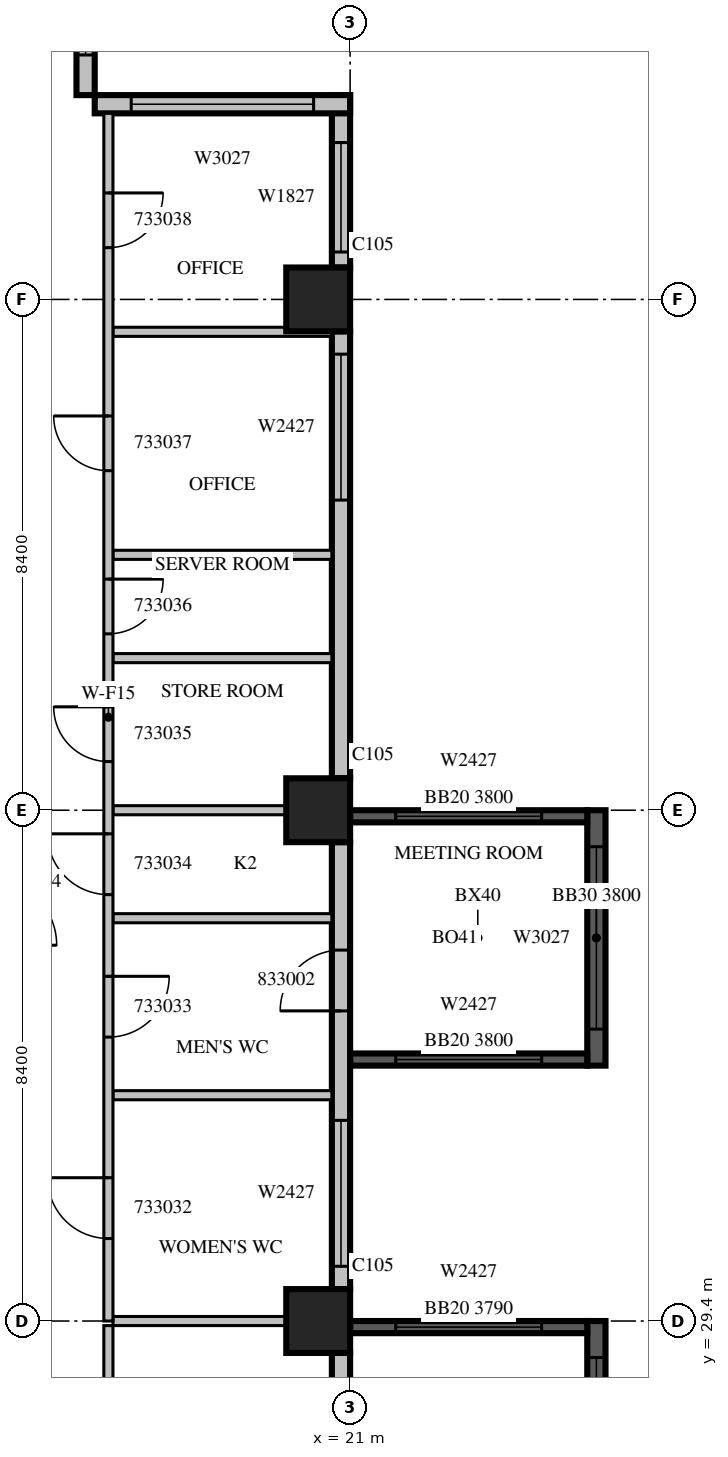
"""IFC4 building model, lengths in metres.
Left out: names, types, materials, properties, quantities, classifications, styles, units other than length and angle.
Written with IfcOpenShell. Run it as: python <this file> out.ifc"""

import sys

from ifc_helpers import new_model, si_unit, direction, frame, frame_2d, origin, origin_2d, place, context, subcontext, project, spatial, rectangle, extrude, source, transform, mapped, element, fill, save


model = new_model("IFC4")
c1 = context("Model", 3, precision=1e-05, world=origin(), true_north=direction((0.0, 1.0)))
c2 = subcontext(c1, "Body", "Model", "MODEL_VIEW")
j1 = project(units=[si_unit("LENGTHUNIT", "METRE"), si_unit("PLANEANGLEUNIT", "RADIAN")], contexts=[c1])
p1 = place(None, origin())
s1 = spatial("IfcSite", under=j1, at=p1, CompositionType="ELEMENT")
p2 = place(p1, origin())
s2 = spatial("IfcBuilding", under=s1, at=p2, CompositionType="ELEMENT")
p3 = place(p2, frame((0.0, 0.0, 149.7)))
s3 = spatial("IfcBuildingStorey", under=s2, at=p3, CompositionType="ELEMENT", Elevation=149.7)
m1 = source(origin(), c2, "Body", "SweptSolid", [
    extrude(rectangle(XDim=1.05, YDim=1.05, at=origin_2d()), origin(), (0.0, 0.0, 1.0), 4.2),
])
for number, where, z_axis, x_axis in (
    (1, (20.475, 29.4, 0.0), (0.0, 0.0, 1.0), (1.0, 0.0, 0.0)),
    (2, (20.475, 37.8, 0.0), (0.0, 0.0, 1.0), (1.0, 0.0, 0.0)),
    (3, (20.475, 46.2, 0.0), (0.0, 0.0, 1.0), (1.0, 0.0, 0.0)),
):
    element("IfcColumn", number, at=place(p3, frame(where, z_axis=z_axis, x_axis=x_axis)), inside=s3, PredefinedType="COLUMN", context=c2, shape_type="MappedRepresentation", body=[
        mapped(m1, transform((0.0, 0.0, 0.0), scale=1.0)),
    ])
m2 = source(origin(), c2, "Body", "SweptSolid", [
    extrude(rectangle(XDim=4.2, YDim=0.3, at=frame_2d((2.1, 0.0))), origin(), (0.0, 0.0, 1.0), 3.8),
])
p4 = place(p3, frame((25.05, 33.6, 0.0), z_axis=(0.0, 0.0, 1.0), x_axis=(0.0, 1.0, 0.0)))
e4 = element("IfcWall", 4, at=p4, inside=s3, PredefinedType="SOLIDWALL", context=c2, shape_type="MappedRepresentation", body=[
    mapped(m2, transform((0.0, 0.0, 0.0), scale=1.0)),
])
m3 = source(origin(), c2, "Body", "SweptSolid", [
    extrude(rectangle(XDim=3.0, YDim=2.7, at=frame_2d((1.5, 1.35))), frame((0.0, 0.16, 0.0), z_axis=(0.0, -1.0, 0.0), x_axis=(1.0, 0.0, 0.0)), (0.0, 0.0, 1.0), 0.32),
])
p5 = place(p4, frame((0.6, 0.0, 0.6)))
e5 = element("IfcOpeningElement", 5, at=p5, cuts=e4, PredefinedType="OPENING", context=c2, shape_type="MappedRepresentation", body=[
    mapped(m3, transform((0.0, 0.0, 0.0), scale=1.0)),
])
m4 = source(origin(), c2, "Body", "SweptSolid", [
    extrude(rectangle(XDim=3.9, YDim=0.2, at=frame_2d((1.95, 0.0))), origin(), (0.0, 0.0, 1.0), 3.8),
])
p6 = place(p3, frame((21.0, 33.7, 0.0), z_axis=(0.0, 0.0, 1.0), x_axis=(1.0, 0.0, 0.0)))
e6 = element("IfcWall", 6, at=p6, inside=s3, PredefinedType="SOLIDWALL", context=c2, shape_type="MappedRepresentation", body=[
    mapped(m4, transform((0.0, 0.0, 0.0), scale=1.0)),
])
m5 = source(origin(), c2, "Body", "SweptSolid", [
    extrude(rectangle(XDim=2.4, YDim=2.7, at=frame_2d((1.2, 1.35))), frame((0.0, 0.11, 0.0), z_axis=(0.0, -1.0, 0.0), x_axis=(1.0, 0.0, 0.0)), (0.0, 0.0, 1.0), 0.22),
])
p7 = place(p6, frame((0.75, 0.0, 0.6)))
e7 = element("IfcOpeningElement", 7, at=p7, cuts=e6, PredefinedType="OPENING", context=c2, shape_type="MappedRepresentation", body=[
    mapped(m5, transform((0.0, 0.0, 0.0), scale=1.0)),
])
p8 = place(p3, frame((21.0, 37.7, 0.0), z_axis=(0.0, 0.0, 1.0), x_axis=(1.0, 0.0, 0.0)))
e8 = element("IfcWall", 8, at=p8, inside=s3, PredefinedType="SOLIDWALL", context=c2, shape_type="MappedRepresentation", body=[
    mapped(m4, transform((0.0, 0.0, 0.0), scale=1.0)),
])
p9 = place(p8, frame((0.75, 0.0, 0.6)))
e9 = element("IfcOpeningElement", 9, at=p9, cuts=e8, PredefinedType="OPENING", context=c2, shape_type="MappedRepresentation", body=[
    mapped(m5, transform((0.0, 0.0, 0.0), scale=1.0)),
])
m6 = source(origin(), c2, "Body", "SweptSolid", [
    extrude(rectangle(XDim=6.875, YDim=0.3, at=frame_2d((3.438, 0.0))), origin(), (0.0, 0.0, 1.0), 3.8),
])
p10 = place(p3, frame((20.85, 22.0, 0.0), z_axis=(0.0, 0.0, 1.0), x_axis=(0.0, 1.0, 0.0)))
e10 = element("IfcWall", 10, at=p10, inside=s3, PredefinedType="STANDARD", context=c2, shape_type="MappedRepresentation", body=[
    mapped(m6, transform((0.0, 0.0, 0.0), scale=1.0)),
])
m7 = source(origin(), c2, "Body", "SweptSolid", [
    extrude(rectangle(XDim=1.2, YDim=2.7, at=frame_2d((0.6, 1.35))), frame((0.0, 0.16, 0.0), z_axis=(0.0, -1.0, 0.0), x_axis=(1.0, 0.0, 0.0)), (0.0, 0.0, 1.0), 0.32),
])
p11 = place(p10, frame((0.362, 0.0, 0.6)))
e11 = element("IfcOpeningElement", 11, at=p11, cuts=e10, PredefinedType="OPENING", context=c2, shape_type="MappedRepresentation", body=[
    mapped(m7, transform((0.0, 0.0, 0.0), scale=1.0)),
])
m8 = source(origin(), c2, "Body", "SweptSolid", [
    extrude(rectangle(XDim=1.0, YDim=2.1, at=frame_2d((0.5, 1.05))), frame((0.0, 0.16, 0.0), z_axis=(0.0, -1.0, 0.0), x_axis=(1.0, 0.0, 0.0)), (0.0, 0.0, 1.0), 0.32),
])
p12 = place(p10, frame((4.8, 0.0, 0.0)))
e12 = element("IfcOpeningElement", 12, at=p12, cuts=e10, PredefinedType="OPENING", context=c2, shape_type="MappedRepresentation", body=[
    mapped(m8, transform((0.0, 0.0, 0.0), scale=1.0)),
])
m9 = source(origin(), c2, "Body", "SweptSolid", [
    extrude(rectangle(XDim=7.35, YDim=0.3, at=frame_2d((3.675, 0.0))), origin(), (0.0, 0.0, 1.0), 3.8),
])
p13 = place(p3, frame((20.85, 29.925, 0.0), z_axis=(0.0, 0.0, 1.0), x_axis=(0.0, 1.0, 0.0)))
e13 = element("IfcWall", 13, at=p13, inside=s3, PredefinedType="STANDARD", context=c2, shape_type="MappedRepresentation", body=[
    mapped(m9, transform((0.0, 0.0, 0.0), scale=1.0)),
])
m10 = source(origin(), c2, "Body", "SweptSolid", [
    extrude(rectangle(XDim=2.4, YDim=2.7, at=frame_2d((1.2, 1.35))), frame((0.0, 0.16, 0.0), z_axis=(0.0, -1.0, 0.0), x_axis=(1.0, 0.0, 0.0)), (0.0, 0.0, 1.0), 0.32),
])
p14 = place(p13, frame((0.375, 0.0, 0.6)))
e14 = element("IfcOpeningElement", 14, at=p14, cuts=e13, PredefinedType="OPENING", context=c2, shape_type="MappedRepresentation", body=[
    mapped(m10, transform((0.0, 0.0, 0.0), scale=1.0)),
])
p15 = place(p13, frame((4.575, 0.0, 0.0)))
e15 = element("IfcOpeningElement", 15, at=p15, cuts=e13, PredefinedType="OPENING", context=c2, shape_type="MappedRepresentation", body=[
    mapped(m8, transform((0.0, 0.0, 0.0), scale=1.0)),
])
p16 = place(p3, frame((20.85, 38.325, 0.0), z_axis=(0.0, 0.0, 1.0), x_axis=(0.0, 1.0, 0.0)))
e16 = element("IfcWall", 16, at=p16, inside=s3, PredefinedType="STANDARD", context=c2, shape_type="MappedRepresentation", body=[
    mapped(m9, transform((0.0, 0.0, 0.0), scale=1.0)),
])
p17 = place(p16, frame((4.575, 0.0, 0.6)))
e17 = element("IfcOpeningElement", 17, at=p17, cuts=e16, PredefinedType="OPENING", context=c2, shape_type="MappedRepresentation", body=[
    mapped(m10, transform((0.0, 0.0, 0.0), scale=1.0)),
])
m11 = source(origin(), c2, "Body", "SweptSolid", [
    extrude(rectangle(XDim=2.835, YDim=0.3, at=frame_2d((1.417, 0.0))), origin(), (0.0, 0.0, 1.0), 3.8),
])
p18 = place(p3, frame((20.85, 46.725, 0.0), z_axis=(0.0, 0.0, 1.0), x_axis=(0.0, 1.0, 0.0)))
e18 = element("IfcWall", 18, at=p18, inside=s3, PredefinedType="STANDARD", context=c2, shape_type="MappedRepresentation", body=[
    mapped(m11, transform((0.0, 0.0, 0.0), scale=1.0)),
])
m12 = source(origin(), c2, "Body", "SweptSolid", [
    extrude(rectangle(XDim=1.8, YDim=2.7, at=frame_2d((0.9, 1.35))), frame((0.0, 0.16, 0.0), z_axis=(0.0, -1.0, 0.0), x_axis=(1.0, 0.0, 0.0)), (0.0, 0.0, 1.0), 0.32),
])
p19 = place(p18, frame((0.255, 0.0, 0.6)))
e19 = element("IfcOpeningElement", 19, at=p19, cuts=e18, PredefinedType="OPENING", context=c2, shape_type="MappedRepresentation", body=[
    mapped(m12, transform((0.0, 0.0, 0.0), scale=1.0)),
])
m13 = source(origin(), c2, "Body", "SweptSolid", [
    extrude(rectangle(XDim=4.2, YDim=0.3, at=frame_2d((2.1, 0.0))), origin(), (0.0, 0.0, 1.0), 3.8),
])
p20 = place(p3, frame((21.0, 49.41, 0.0), z_axis=(0.0, 0.0, 1.0), x_axis=(-1.0, 0.0, 0.0)))
e20 = element("IfcWall", 20, at=p20, inside=s3, PredefinedType="STANDARD", context=c2, shape_type="MappedRepresentation", body=[
    mapped(m13, transform((0.0, 0.0, 0.0), scale=1.0)),
])
p21 = place(p20, frame((0.6, 0.0, 0.6)))
e21 = element("IfcOpeningElement", 21, at=p21, cuts=e20, PredefinedType="OPENING", context=c2, shape_type="MappedRepresentation", body=[
    mapped(m3, transform((0.0, 0.0, 0.0), scale=1.0)),
])
m14 = source(origin(), c2, "Body", "SweptSolid", [
    extrude(rectangle(XDim=2.52, YDim=0.3, at=frame_2d((1.26, 0.0))), origin(), (0.0, 0.0, 1.0), 3.8),
])
p22 = place(p3, frame((16.65, 49.56, 0.0), z_axis=(0.0, 0.0, 1.0), x_axis=(0.0, 1.0, 0.0)))
e22 = element("IfcWall", 22, at=p22, inside=s3, PredefinedType="STANDARD", context=c2, shape_type="MappedRepresentation", body=[
    mapped(m14, transform((0.0, 0.0, 0.0), scale=1.0)),
])
p23 = place(p22, frame((0.66, 0.0, 0.6)))
e23 = element("IfcOpeningElement", 23, at=p23, cuts=e22, PredefinedType="OPENING", context=c2, shape_type="MappedRepresentation", body=[
    mapped(m7, transform((0.0, 0.0, 0.0), scale=1.0)),
])
m15 = source(origin(), c2, "Body", "SweptSolid", [
    extrude(rectangle(XDim=4.2, YDim=0.3, at=frame_2d((2.1, 0.0))), origin(), (0.0, 0.0, 1.0), 3.79),
])
p24 = place(p3, frame((25.05, 25.2, 0.0), z_axis=(0.0, 0.0, 1.0), x_axis=(0.0, 1.0, 0.0)))
e24 = element("IfcWall", 24, at=p24, inside=s3, PredefinedType="SOLIDWALL", context=c2, shape_type="MappedRepresentation", body=[
    mapped(m15, transform((0.0, 0.0, 0.0), scale=1.0)),
])
p25 = place(p24, frame((0.6, 0.0, 0.6)))
e25 = element("IfcOpeningElement", 25, at=p25, cuts=e24, PredefinedType="OPENING", context=c2, shape_type="MappedRepresentation", body=[
    mapped(m3, transform((0.0, 0.0, 0.0), scale=1.0)),
])
m16 = source(origin(), c2, "Body", "SweptSolid", [
    extrude(rectangle(XDim=3.9, YDim=0.2, at=frame_2d((1.95, 0.0))), origin(), (0.0, 0.0, 1.0), 3.79),
])
p26 = place(p3, frame((21.0, 29.3, 0.0), z_axis=(0.0, 0.0, 1.0), x_axis=(1.0, 0.0, 0.0)))
e26 = element("IfcWall", 26, at=p26, inside=s3, PredefinedType="SOLIDWALL", context=c2, shape_type="MappedRepresentation", body=[
    mapped(m16, transform((0.0, 0.0, 0.0), scale=1.0)),
])
p27 = place(p26, frame((0.75, 0.0, 0.6)))
e27 = element("IfcOpeningElement", 27, at=p27, cuts=e26, PredefinedType="OPENING", context=c2, shape_type="MappedRepresentation", body=[
    mapped(m5, transform((0.0, 0.0, 0.0), scale=1.0)),
])
m17 = source(origin(), c2, "Body", "SweptSolid", [
    extrude(rectangle(XDim=5.35, YDim=0.15, at=frame_2d((2.675, 0.0))), origin(), (0.0, 0.0, 1.0), 3.8),
])
p28 = place(p3, frame((17.025, 29.325, 0.0), z_axis=(0.0, 0.0, 1.0), x_axis=(0.0, -1.0, 0.0)))
e28 = element("IfcWall", 28, at=p28, inside=s3, PredefinedType="PARTITIONING", context=c2, shape_type="MappedRepresentation", body=[
    mapped(m17, transform((0.0, 0.0, 0.0), scale=1.0)),
])
m18 = source(origin(), c2, "Body", "SweptSolid", [
    extrude(rectangle(XDim=2.851, YDim=0.15, at=frame_2d((1.425, 0.0))), origin(), (0.0, 0.0, 1.0), 3.8),
])
p29 = place(p3, frame((19.951, 29.4, 0.0), z_axis=(0.0, 0.0, 1.0), x_axis=(-1.0, 0.0, 0.0)))
e29 = element("IfcWall", 29, at=p29, inside=s3, PredefinedType="PARTITIONING", context=c2, shape_type="MappedRepresentation", body=[
    mapped(m18, transform((0.0, 0.0, 0.0), scale=1.0)),
])
m19 = source(origin(), c2, "Body", "SweptSolid", [
    extrude(rectangle(XDim=3.6, YDim=0.15, at=frame_2d((1.8, 0.0))), origin(), (0.0, 0.0, 1.0), 3.8),
])
for number, where, z_axis, x_axis in (
    (30, (17.1, 33.113, 0.0), (0.0, 0.0, 1.0), (1.0, 0.0, 0.0)),
    (31, (17.1, 36.024, 0.0), (0.0, 0.0, 1.0), (1.0, 0.0, 0.0)),
    (32, (17.1, 40.301, 0.0), (0.0, 0.0, 1.0), (1.0, 0.0, 0.0)),
    (33, (17.1, 45.667, 0.0), (0.0, 0.0, 1.0), (1.0, 0.0, 0.0)),
):
    element("IfcWall", number, at=place(p3, frame(where, z_axis=z_axis, x_axis=x_axis)), inside=s3, PredefinedType="PARTITIONING", context=c2, shape_type="MappedRepresentation", body=[
        mapped(m19, transform((0.0, 0.0, 0.0), scale=1.0)),
    ])
p30 = place(p3, frame((19.951, 37.8, 0.0), z_axis=(0.0, 0.0, 1.0), x_axis=(-1.0, 0.0, 0.0)))
e34 = element("IfcWall", 34, at=p30, inside=s3, PredefinedType="PARTITIONING", context=c2, shape_type="MappedRepresentation", body=[
    mapped(m18, transform((0.0, 0.0, 0.0), scale=1.0)),
])
p31 = place(p3, frame((20.7, 42.0, 0.0), z_axis=(0.0, 0.0, 1.0), x_axis=(-1.0, 0.0, 0.0)))
e35 = element("IfcWall", 35, at=p31, inside=s3, PredefinedType="PARTITIONING", context=c2, shape_type="MappedRepresentation", body=[
    mapped(m19, transform((0.0, 0.0, 0.0), scale=1.0)),
])
m20 = source(origin(), c2, "Body", "SweptSolid", [
    extrude(rectangle(XDim=19.86, YDim=0.15, at=frame_2d((9.93, 0.0))), origin(), (0.0, 0.0, 1.0), 3.8),
])
p32 = place(p3, frame((17.025, 49.26, 0.0), z_axis=(0.0, 0.0, 1.0), x_axis=(0.0, -1.0, 0.0)))
e36 = element("IfcWall", 36, at=p32, inside=s3, PredefinedType="PARTITIONING", context=c2, shape_type="MappedRepresentation", body=[
    mapped(m20, transform((0.0, 0.0, 0.0), scale=1.0)),
])
m21 = source(origin(), c2, "Body", "SweptSolid", [
    extrude(rectangle(XDim=1.0, YDim=2.1, at=frame_2d((0.5, 1.05))), frame((0.0, 0.085, 0.0), z_axis=(0.0, -1.0, 0.0), x_axis=(1.0, 0.0, 0.0)), (0.0, 0.0, 1.0), 0.17),
])
p33 = place(p32, frame((17.503, 0.0, 0.0)))
e37 = element("IfcOpeningElement", 37, at=p33, cuts=e36, PredefinedType="OPENING", context=c2, shape_type="MappedRepresentation", body=[
    mapped(m21, transform((0.0, 0.0, 0.0), scale=1.0)),
])
p34 = place(p32, frame((14.191, 0.0, 0.0)))
e38 = element("IfcOpeningElement", 38, at=p34, cuts=e36, PredefinedType="OPENING", context=c2, shape_type="MappedRepresentation", body=[
    mapped(m21, transform((0.0, 0.0, 0.0), scale=1.0)),
])
p35 = place(p32, frame((11.848, 0.0, 0.0)))
e39 = element("IfcOpeningElement", 39, at=p35, cuts=e36, PredefinedType="OPENING", context=c2, shape_type="MappedRepresentation", body=[
    mapped(m21, transform((0.0, 0.0, 0.0), scale=1.0)),
])
m22 = source(origin(), c2, "Body", "SweptSolid", [
    extrude(rectangle(XDim=0.9, YDim=2.1, at=frame_2d((0.45, 1.05))), frame((0.0, 0.085, 0.0), z_axis=(0.0, -1.0, 0.0), x_axis=(1.0, 0.0, 0.0)), (0.0, 0.0, 1.0), 0.17),
])
p36 = place(p32, frame((9.759, 0.0, 0.0)))
e40 = element("IfcOpeningElement", 40, at=p36, cuts=e36, PredefinedType="OPENING", context=c2, shape_type="MappedRepresentation", body=[
    mapped(m22, transform((0.0, 0.0, 0.0), scale=1.0)),
])
p37 = place(p32, frame((7.659, 0.0, 0.0)))
e41 = element("IfcOpeningElement", 41, at=p37, cuts=e36, PredefinedType="OPENING", context=c2, shape_type="MappedRepresentation", body=[
    mapped(m22, transform((0.0, 0.0, 0.0), scale=1.0)),
])
p38 = place(p32, frame((4.976, 0.0, 0.0)))
e42 = element("IfcOpeningElement", 42, at=p38, cuts=e36, PredefinedType="OPENING", context=c2, shape_type="MappedRepresentation", body=[
    mapped(m22, transform((0.0, 0.0, 0.0), scale=1.0)),
])
p39 = place(p32, frame((1.309, 0.0, 0.0)))
e43 = element("IfcOpeningElement", 43, at=p39, cuts=e36, PredefinedType="OPENING", context=c2, shape_type="MappedRepresentation", body=[
    mapped(m22, transform((0.0, 0.0, 0.0), scale=1.0)),
])
m23 = source(origin(), c2, "Body", "SweptSolid", [
    extrude(rectangle(XDim=3.0, YDim=2.7, at=frame_2d((1.5, 1.35))), frame((0.0, 0.03, 0.0), z_axis=(0.0, -1.0, 0.0), x_axis=(1.0, 0.0, 0.0)), (0.0, 0.0, 1.0), 0.06),
])
p40 = place(p5, origin())
e44 = element("IfcWindow", 44, at=p40, inside=s3, PartitioningType="SINGLE_PANEL", PredefinedType="WINDOW", context=c2, shape_type="MappedRepresentation", body=[
    mapped(m23, transform((0.0, 0.0, 0.0), scale=1.0)),
])
fill(e5, e44)
m24 = source(origin(), c2, "Body", "SweptSolid", [
    extrude(rectangle(XDim=2.4, YDim=2.7, at=frame_2d((1.2, 1.35))), frame((0.0, 0.03, 0.0), z_axis=(0.0, -1.0, 0.0), x_axis=(1.0, 0.0, 0.0)), (0.0, 0.0, 1.0), 0.06),
])
p41 = place(p7, origin())
e45 = element("IfcWindow", 45, at=p41, inside=s3, PartitioningType="SINGLE_PANEL", PredefinedType="WINDOW", context=c2, shape_type="MappedRepresentation", body=[
    mapped(m24, transform((0.0, 0.0, 0.0), scale=1.0)),
])
fill(e7, e45)
p42 = place(p9, origin())
e46 = element("IfcWindow", 46, at=p42, inside=s3, PartitioningType="SINGLE_PANEL", PredefinedType="WINDOW", context=c2, shape_type="MappedRepresentation", body=[
    mapped(m24, transform((0.0, 0.0, 0.0), scale=1.0)),
])
fill(e9, e46)
p43 = place(p14, origin())
e47 = element("IfcWindow", 47, at=p43, inside=s3, PartitioningType="SINGLE_PANEL", PredefinedType="WINDOW", context=c2, shape_type="MappedRepresentation", body=[
    mapped(m24, transform((0.0, 0.0, 0.0), scale=1.0)),
])
fill(e14, e47)
p44 = place(p17, origin())
e48 = element("IfcWindow", 48, at=p44, inside=s3, PartitioningType="SINGLE_PANEL", PredefinedType="WINDOW", context=c2, shape_type="MappedRepresentation", body=[
    mapped(m24, transform((0.0, 0.0, 0.0), scale=1.0)),
])
fill(e17, e48)
m25 = source(origin(), c2, "Body", "SweptSolid", [
    extrude(rectangle(XDim=1.8, YDim=2.7, at=frame_2d((0.9, 1.35))), frame((0.0, 0.03, 0.0), z_axis=(0.0, -1.0, 0.0), x_axis=(1.0, 0.0, 0.0)), (0.0, 0.0, 1.0), 0.06),
])
p45 = place(p19, origin())
e49 = element("IfcWindow", 49, at=p45, inside=s3, PartitioningType="SINGLE_PANEL", PredefinedType="WINDOW", context=c2, shape_type="MappedRepresentation", body=[
    mapped(m25, transform((0.0, 0.0, 0.0), scale=1.0)),
])
fill(e19, e49)
p46 = place(p21, origin())
e50 = element("IfcWindow", 50, at=p46, inside=s3, PartitioningType="SINGLE_PANEL", PredefinedType="WINDOW", context=c2, shape_type="MappedRepresentation", body=[
    mapped(m23, transform((0.0, 0.0, 0.0), scale=1.0)),
])
fill(e21, e50)
m26 = source(origin(), c2, "Body", "SweptSolid", [
    extrude(rectangle(XDim=1.2, YDim=2.7, at=frame_2d((0.6, 1.35))), frame((0.0, 0.03, 0.0), z_axis=(0.0, -1.0, 0.0), x_axis=(1.0, 0.0, 0.0)), (0.0, 0.0, 1.0), 0.06),
])
p47 = place(p23, origin())
e51 = element("IfcWindow", 51, at=p47, inside=s3, PartitioningType="SINGLE_PANEL", PredefinedType="WINDOW", context=c2, shape_type="MappedRepresentation", body=[
    mapped(m26, transform((0.0, 0.0, 0.0), scale=1.0)),
])
fill(e23, e51)
p48 = place(p25, origin())
e52 = element("IfcWindow", 52, at=p48, inside=s3, PartitioningType="SINGLE_PANEL", PredefinedType="WINDOW", context=c2, shape_type="MappedRepresentation", body=[
    mapped(m23, transform((0.0, 0.0, 0.0), scale=1.0)),
])
fill(e25, e52)
p49 = place(p27, origin())
e53 = element("IfcWindow", 53, at=p49, inside=s3, PartitioningType="SINGLE_PANEL", PredefinedType="WINDOW", context=c2, shape_type="MappedRepresentation", body=[
    mapped(m24, transform((0.0, 0.0, 0.0), scale=1.0)),
])
fill(e27, e53)
m27 = source(origin(), c2, "Body", "SweptSolid", [
    extrude(rectangle(XDim=1.0, YDim=2.1, at=frame_2d((0.5, 1.05))), frame((0.0, 0.025, 0.0), z_axis=(0.0, -1.0, 0.0), x_axis=(1.0, 0.0, 0.0)), (0.0, 0.0, 1.0), 0.05),
])
p50 = place(p33, origin())
e54 = element("IfcDoor", 54, at=p50, inside=s3, OperationType="SINGLE_SWING_RIGHT", PredefinedType="DOOR", context=c2, shape_type="MappedRepresentation", body=[
    mapped(m27, transform((0.0, 0.0, 0.0), scale=1.0)),
])
fill(e37, e54)
p51 = place(p34, origin())
e55 = element("IfcDoor", 55, at=p51, inside=s3, OperationType="SINGLE_SWING_LEFT", PredefinedType="DOOR", context=c2, shape_type="MappedRepresentation", body=[
    mapped(m27, transform((0.0, 0.0, 0.0), scale=1.0)),
])
fill(e38, e55)
p52 = place(p35, origin())
e56 = element("IfcDoor", 56, at=p52, inside=s3, OperationType="SINGLE_SWING_RIGHT", PredefinedType="DOOR", context=c2, shape_type="MappedRepresentation", body=[
    mapped(m27, transform((0.0, 0.0, 0.0), scale=1.0)),
])
fill(e39, e56)
m28 = source(origin(), c2, "Body", "SweptSolid", [
    extrude(rectangle(XDim=0.9, YDim=2.1, at=frame_2d((0.45, 1.05))), frame((0.0, 0.025, 0.0), z_axis=(0.0, -1.0, 0.0), x_axis=(1.0, 0.0, 0.0)), (0.0, 0.0, 1.0), 0.05),
])
p53 = place(p36, origin())
e57 = element("IfcDoor", 57, at=p53, inside=s3, OperationType="SINGLE_SWING_RIGHT", PredefinedType="DOOR", context=c2, shape_type="MappedRepresentation", body=[
    mapped(m28, transform((0.0, 0.0, 0.0), scale=1.0)),
])
fill(e40, e57)
p54 = place(p37, origin())
e58 = element("IfcDoor", 58, at=p54, inside=s3, OperationType="SINGLE_SWING_LEFT", PredefinedType="DOOR", context=c2, shape_type="MappedRepresentation", body=[
    mapped(m28, transform((0.0, 0.0, 0.0), scale=1.0)),
])
fill(e41, e58)
p55 = place(p38, origin())
e59 = element("IfcDoor", 59, at=p55, inside=s3, OperationType="SINGLE_SWING_RIGHT", PredefinedType="DOOR", context=c2, shape_type="MappedRepresentation", body=[
    mapped(m28, transform((0.0, 0.0, 0.0), scale=1.0)),
])
fill(e42, e59)
p56 = place(p39, origin())
e60 = element("IfcDoor", 60, at=p56, inside=s3, OperationType="SINGLE_SWING_LEFT", PredefinedType="DOOR", context=c2, shape_type="MappedRepresentation", body=[
    mapped(m28, transform((0.0, 0.0, 0.0), scale=1.0)),
])
fill(e43, e60)
p57 = place(p15, origin())
e61 = element("IfcDoor", 61, at=p57, inside=s3, OperationType="SINGLE_SWING_LEFT", PredefinedType="DOOR", context=c2, shape_type="MappedRepresentation", body=[
    mapped(m27, transform((0.0, 0.0, 0.0), scale=1.0)),
])
fill(e15, e61)
save(model, sys.argv[1])
